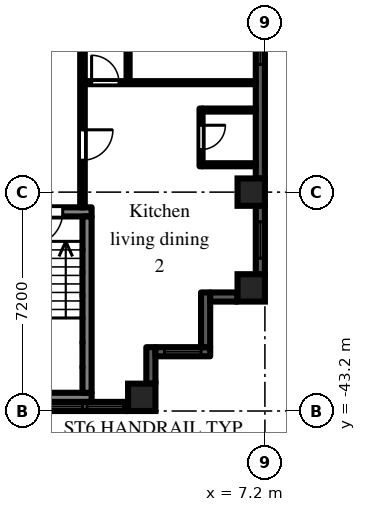
"""IFC4 building model, lengths in metres.
Left out: names, types, materials, properties, quantities, classifications, styles, units other than length and angle.
Written with IfcOpenShell. Run it as: python <this file> out.ifc"""

import sys

from ifc_helpers import new_model, si_unit, direction, frame, frame_2d, origin, origin_2d, place, context, subcontext, project, spatial, rectangle, extrude, element, fill, save


model = new_model("IFC4")
c1 = context("Model", 3, precision=1e-05, world=origin(), true_north=direction((0.0, 1.0)))
c2 = subcontext(c1, "Body", "Model", "MODEL_VIEW")
j1 = project(units=[si_unit("LENGTHUNIT", "METRE"), si_unit("PLANEANGLEUNIT", "RADIAN")], contexts=[c1])
p1 = place(None, origin())
s1 = spatial("IfcSite", under=j1, at=p1, CompositionType="ELEMENT")
p2 = place(p1, origin())
s2 = spatial("IfcBuilding", under=s1, at=p2, CompositionType="ELEMENT")
p3 = place(p2, frame((0.0, 0.0, 44.7)))
s3 = spatial("IfcBuildingStorey", under=s2, at=p3, CompositionType="ELEMENT", Elevation=44.7)
for number, where, z_axis, x_axis in (
    (1, (3.15, -42.75, 0.0), (0.0, 0.0, 1.0), (1.0, 0.0, 0.0)),
    (2, (6.75, -39.15, 0.0), (0.0, 0.0, 1.0), (1.0, 0.0, 0.0)),
    (3, (6.75, -36.0, 0.0), (0.0, 0.0, 1.0), (1.0, 0.0, 0.0)),
):
    element("IfcColumn", number, at=place(p3, frame(where, z_axis=z_axis, x_axis=x_axis)), inside=s3, PredefinedType="COLUMN", context=c2, shape_type="SweptSolid", body=[
        extrude(rectangle(XDim=0.9, YDim=0.9, at=origin_2d()), origin(), (0.0, 0.0, 1.0), 3.0),
    ])
p4 = place(p3, frame((-2.7, -43.05, 0.0), z_axis=(0.0, 0.0, 1.0), x_axis=(1.0, 0.0, 0.0)))
e4 = element("IfcWall", 4, at=p4, inside=s3, PredefinedType="SOLIDWALL", context=c2, shape_type="SweptSolid", body=[
    extrude(rectangle(XDim=5.4, YDim=0.3, at=frame_2d((2.7, 0.0))), origin(), (0.0, 0.0, 1.0), 2.1),
])
p5 = place(p4, frame((1.5, 0.0, 0.2)))
e5 = element("IfcOpeningElement", 5, at=p5, cuts=e4, PredefinedType="OPENING", context=c2, shape_type="SweptSolid", body=[
    extrude(rectangle(XDim=2.4, YDim=1.85, at=frame_2d((1.2, 0.925))), frame((0.0, 0.16, 0.0), z_axis=(0.0, -1.0, 0.0), x_axis=(1.0, 0.0, 0.0)), (0.0, 0.0, 1.0), 0.32),
])
p6 = place(p4, frame((0.15, 0.0, 0.2)))
e6 = element("IfcOpeningElement", 6, at=p6, cuts=e4, PredefinedType="OPENING", context=c2, shape_type="SweptSolid", body=[
    extrude(rectangle(XDim=1.2, YDim=1.85, at=frame_2d((0.6, 0.925))), frame((0.0, 0.16, 0.0), z_axis=(0.0, -1.0, 0.0), x_axis=(1.0, 0.0, 0.0)), (0.0, 0.0, 1.0), 0.32),
])
p7 = place(p4, frame((4.05, 0.0, 0.2)))
e7 = element("IfcOpeningElement", 7, at=p7, cuts=e4, PredefinedType="OPENING", context=c2, shape_type="SweptSolid", body=[
    extrude(rectangle(XDim=1.2, YDim=1.85, at=frame_2d((0.6, 0.925))), frame((0.0, 0.16, 0.0), z_axis=(0.0, -1.0, 0.0), x_axis=(1.0, 0.0, 0.0)), (0.0, 0.0, 1.0), 0.32),
])
p8 = place(p3, frame((3.45, -42.3, 0.0), z_axis=(0.0, 0.0, 1.0), x_axis=(0.0, 1.0, 0.0)))
e8 = element("IfcWall", 8, at=p8, inside=s3, PredefinedType="SOLIDWALL", context=c2, shape_type="SweptSolid", body=[
    extrude(rectangle(XDim=1.2, YDim=0.3, at=frame_2d((0.6, 0.0))), origin(), (0.0, 0.0, 1.0), 2.575),
])
p9 = place(p3, frame((3.6, -41.25, 0.0), z_axis=(0.0, 0.0, 1.0), x_axis=(1.0, 0.0, 0.0)))
e9 = element("IfcWall", 9, at=p9, inside=s3, PredefinedType="SOLIDWALL", context=c2, shape_type="SweptSolid", body=[
    extrude(rectangle(XDim=1.8, YDim=0.3, at=frame_2d((0.9, 0.0))), origin(), (0.0, 0.0, 1.0), 2.575),
])
p10 = place(p9, frame((0.3, 0.0, 0.2)))
e10 = element("IfcOpeningElement", 10, at=p10, cuts=e9, PredefinedType="OPENING", context=c2, shape_type="SweptSolid", body=[
    extrude(rectangle(XDim=1.2, YDim=1.85, at=frame_2d((0.6, 0.925))), frame((0.0, 0.16, 0.0), z_axis=(0.0, -1.0, 0.0), x_axis=(1.0, 0.0, 0.0)), (0.0, 0.0, 1.0), 0.32),
])
p11 = place(p3, frame((5.25, -41.1, 0.0), z_axis=(0.0, 0.0, 1.0), x_axis=(0.0, 1.0, 0.0)))
e11 = element("IfcWall", 11, at=p11, inside=s3, PredefinedType="SOLIDWALL", context=c2, shape_type="SweptSolid", body=[
    extrude(rectangle(XDim=1.8, YDim=0.3, at=frame_2d((0.9, 0.0))), origin(), (0.0, 0.0, 1.0), 2.575),
])
p12 = place(p3, frame((5.4, -39.45, 0.0), z_axis=(0.0, 0.0, 1.0), x_axis=(1.0, 0.0, 0.0)))
e12 = element("IfcWall", 12, at=p12, inside=s3, PredefinedType="SOLIDWALL", context=c2, shape_type="SweptSolid", body=[
    extrude(rectangle(XDim=0.9, YDim=0.3, at=frame_2d((0.45, 0.0))), origin(), (0.0, 0.0, 1.0), 2.575),
])
p13 = place(p3, frame((7.05, -38.7, 0.0), z_axis=(0.0, 0.0, 1.0), x_axis=(0.0, 1.0, 0.0)))
e13 = element("IfcWall", 13, at=p13, inside=s3, PredefinedType="SOLIDWALL", context=c2, shape_type="SweptSolid", body=[
    extrude(rectangle(XDim=2.25, YDim=0.3, at=frame_2d((1.125, 0.0))), origin(), (0.0, 0.0, 1.0), 2.1),
])
p14 = place(p13, frame((0.525, 0.0, 0.2)))
e14 = element("IfcOpeningElement", 14, at=p14, cuts=e13, PredefinedType="OPENING", context=c2, shape_type="SweptSolid", body=[
    extrude(rectangle(XDim=1.2, YDim=1.85, at=frame_2d((0.6, 0.925))), frame((0.0, 0.16, 0.0), z_axis=(0.0, -1.0, 0.0), x_axis=(1.0, 0.0, 0.0)), (0.0, 0.0, 1.0), 0.32),
])
p15 = place(p3, frame((7.05, -35.55, 0.0), z_axis=(0.0, 0.0, 1.0), x_axis=(0.0, 1.0, 0.0)))
e15 = element("IfcWall", 15, at=p15, inside=s3, PredefinedType="SOLIDWALL", context=c2, shape_type="SweptSolid", body=[
    extrude(rectangle(XDim=6.3, YDim=0.3, at=frame_2d((3.15, 0.0))), origin(), (0.0, 0.0, 1.0), 2.1),
])
p16 = place(p15, frame((3.75, 0.0, 0.2)))
e16 = element("IfcOpeningElement", 16, at=p16, cuts=e15, PredefinedType="OPENING", context=c2, shape_type="SweptSolid", body=[
    extrude(rectangle(XDim=2.4, YDim=1.85, at=frame_2d((1.2, 0.925))), frame((0.0, 0.16, 0.0), z_axis=(0.0, -1.0, 0.0), x_axis=(1.0, 0.0, 0.0)), (0.0, 0.0, 1.0), 0.32),
])
p17 = place(p3, frame((-1.5, -36.65, 0.0), z_axis=(0.0, 0.0, 1.0), x_axis=(1.0, 0.0, 0.0)))
e17 = element("IfcWall", 17, at=p17, inside=s3, PredefinedType="SHEAR", context=c2, shape_type="SweptSolid", body=[
    extrude(rectangle(XDim=3.0, YDim=0.3, at=frame_2d((1.5, 0.0))), origin(), (0.0, 0.0, 1.0), 2.575),
])
p18 = place(p17, frame((0.95, 0.0, 0.0)))
e18 = element("IfcOpeningElement", 18, at=p18, cuts=e17, PredefinedType="OPENING", context=c2, shape_type="SweptSolid", body=[
    extrude(rectangle(XDim=1.1, YDim=2.1, at=frame_2d((0.55, 1.05))), frame((0.0, 0.16, 0.0), z_axis=(0.0, -1.0, 0.0), x_axis=(1.0, 0.0, 0.0)), (0.0, 0.0, 1.0), 0.32),
])
p19 = place(p3, frame((-1.5, -42.75, 0.0), z_axis=(0.0, 0.0, 1.0), x_axis=(1.0, 0.0, 0.0)))
e19 = element("IfcWall", 19, at=p19, inside=s3, PredefinedType="SHEAR", context=c2, shape_type="SweptSolid", body=[
    extrude(rectangle(XDim=3.0, YDim=0.3, at=frame_2d((1.5, 0.0))), origin(), (0.0, 0.0, 1.0), 2.575),
])
p20 = place(p3, frame((1.35, -36.8, 0.0), z_axis=(0.0, 0.0, 1.0), x_axis=(0.0, -1.0, 0.0)))
e20 = element("IfcWall", 20, at=p20, inside=s3, PredefinedType="SHEAR", context=c2, shape_type="SweptSolid", body=[
    extrude(rectangle(XDim=5.8, YDim=0.3, at=frame_2d((2.9, 0.0))), origin(), (0.0, 0.0, 1.0), 2.575),
])
p21 = place(p3, frame((1.2, -36.5, 0.0), z_axis=(0.0, 0.0, 1.0), x_axis=(0.0, 1.0, 0.0)))
e21 = element("IfcWall", 21, at=p21, inside=s3, PredefinedType="PARTITIONING", context=c2, shape_type="SweptSolid", body=[
    extrude(rectangle(XDim=35.375, YDim=0.15, at=frame_2d((17.688, 0.0))), origin(), (0.0, 0.0, 1.0), 2.575),
])
p22 = place(p21, frame((30.75, 0.0, 0.0)))
e22 = element("IfcOpeningElement", 22, at=p22, cuts=e21, PredefinedType="OPENING", context=c2, shape_type="SweptSolid", body=[
    extrude(rectangle(XDim=0.9, YDim=2.1, at=frame_2d((0.45, 1.05))), frame((0.0, 0.085, 0.0), z_axis=(0.0, -1.0, 0.0), x_axis=(1.0, 0.0, 0.0)), (0.0, 0.0, 1.0), 0.17),
])
p23 = place(p21, frame((23.45, 0.0, 0.0)))
e23 = element("IfcOpeningElement", 23, at=p23, cuts=e21, PredefinedType="OPENING", context=c2, shape_type="SweptSolid", body=[
    extrude(rectangle(XDim=0.9, YDim=2.1, at=frame_2d((0.45, 1.05))), frame((0.0, 0.085, 0.0), z_axis=(0.0, -1.0, 0.0), x_axis=(1.0, 0.0, 0.0)), (0.0, 0.0, 1.0), 0.17),
])
p24 = place(p21, frame((19.85, 0.0, 0.0)))
e24 = element("IfcOpeningElement", 24, at=p24, cuts=e21, PredefinedType="OPENING", context=c2, shape_type="SweptSolid", body=[
    extrude(rectangle(XDim=0.9, YDim=2.1, at=frame_2d((0.45, 1.05))), frame((0.0, 0.085, 0.0), z_axis=(0.0, -1.0, 0.0), x_axis=(1.0, 0.0, 0.0)), (0.0, 0.0, 1.0), 0.17),
])
p25 = place(p21, frame((1.55, 0.0, 0.0)))
e25 = element("IfcOpeningElement", 25, at=p25, cuts=e21, PredefinedType="OPENING", context=c2, shape_type="SweptSolid", body=[
    extrude(rectangle(XDim=1.0, YDim=2.1, at=frame_2d((0.5, 1.05))), frame((0.0, 0.085, 0.0), z_axis=(0.0, -1.0, 0.0), x_axis=(1.0, 0.0, 0.0)), (0.0, 0.0, 1.0), 0.17),
])
p26 = place(p3, frame((1.275, -32.4, 0.0), z_axis=(0.0, 0.0, 1.0), x_axis=(1.0, 0.0, 0.0)))
e26 = element("IfcWall", 26, at=p26, inside=s3, PredefinedType="PARTITIONING", context=c2, shape_type="SweptSolid", body=[
    extrude(rectangle(XDim=5.625, YDim=0.1, at=frame_2d((2.812, 0.0))), origin(), (0.0, 0.0, 1.0), 2.575),
])
p27 = place(p26, frame((0.225, 0.0, 0.0)))
e27 = element("IfcOpeningElement", 27, at=p27, cuts=e26, PredefinedType="OPENING", context=c2, shape_type="SweptSolid", body=[
    extrude(rectangle(XDim=0.9, YDim=2.1, at=frame_2d((0.45, 1.05))), frame((0.0, 0.06, 0.0), z_axis=(0.0, -1.0, 0.0), x_axis=(1.0, 0.0, 0.0)), (0.0, 0.0, 1.0), 0.12),
])
p28 = place(p3, frame((2.7, -32.35, 0.0), z_axis=(0.0, 0.0, 1.0), x_axis=(0.0, 1.0, 0.0)))
e28 = element("IfcWall", 28, at=p28, inside=s3, PredefinedType="PARTITIONING", context=c2, shape_type="SweptSolid", body=[
    extrude(rectangle(XDim=14.3, YDim=0.1, at=frame_2d((7.15, 0.0))), origin(), (0.0, 0.0, 1.0), 2.575),
])
p29 = place(p28, frame((1.12, 0.0, 0.0)))
e29 = element("IfcOpeningElement", 29, at=p29, cuts=e28, PredefinedType="OPENING", context=c2, shape_type="SweptSolid", body=[
    extrude(rectangle(XDim=0.9, YDim=2.1, at=frame_2d((0.45, 1.05))), frame((0.0, 0.06, 0.0), z_axis=(0.0, -1.0, 0.0), x_axis=(1.0, 0.0, 0.0)), (0.0, 0.0, 1.0), 0.12),
])
p30 = place(p28, frame((12.28, 0.0, 0.0)))
e30 = element("IfcOpeningElement", 30, at=p30, cuts=e28, PredefinedType="OPENING", context=c2, shape_type="SweptSolid", body=[
    extrude(rectangle(XDim=0.9, YDim=2.1, at=frame_2d((0.45, 1.05))), frame((0.0, 0.06, 0.0), z_axis=(0.0, -1.0, 0.0), x_axis=(1.0, 0.0, 0.0)), (0.0, 0.0, 1.0), 0.12),
])
p31 = place(p3, frame((5.1, -35.15, 0.0), z_axis=(0.0, 0.0, 1.0), x_axis=(0.0, 1.0, 0.0)))
e31 = element("IfcWall", 31, at=p31, inside=s3, PredefinedType="PARTITIONING", context=c2, shape_type="SweptSolid", body=[
    extrude(rectangle(XDim=1.9, YDim=0.1, at=frame_2d((0.95, 0.0))), origin(), (0.0, 0.0, 1.0), 2.575),
])
p32 = place(p31, frame((0.55, 0.0, 0.0)))
e32 = element("IfcOpeningElement", 32, at=p32, cuts=e31, PredefinedType="OPENING", context=c2, shape_type="SweptSolid", body=[
    extrude(rectangle(XDim=0.8, YDim=2.1, at=frame_2d((0.4, 1.05))), frame((0.0, 0.06, 0.0), z_axis=(0.0, -1.0, 0.0), x_axis=(1.0, 0.0, 0.0)), (0.0, 0.0, 1.0), 0.12),
])
for number, where, z_axis, x_axis in (
    (33, (5.15, -35.1, 0.0), (0.0, 0.0, 1.0), (1.0, 0.0, 0.0)),
    (34, (5.15, -33.3, 0.0), (0.0, 0.0, 1.0), (1.0, 0.0, 0.0)),
):
    element("IfcWall", number, at=place(p3, frame(where, z_axis=z_axis, x_axis=x_axis)), inside=s3, PredefinedType="PARTITIONING", context=c2, shape_type="SweptSolid", body=[
        extrude(rectangle(XDim=1.75, YDim=0.1, at=frame_2d((0.875, 0.0))), origin(), (0.0, 0.0, 1.0), 2.575),
    ])
p33 = place(p5, origin())
e35 = element("IfcWindow", 35, at=p33, inside=s3, PartitioningType="SINGLE_PANEL", PredefinedType="WINDOW", context=c2, shape_type="SweptSolid", body=[
    extrude(rectangle(XDim=2.4, YDim=1.85, at=frame_2d((1.2, 0.925))), frame((0.0, 0.03, 0.0), z_axis=(0.0, -1.0, 0.0), x_axis=(1.0, 0.0, 0.0)), (0.0, 0.0, 1.0), 0.06),
])
fill(e5, e35)
p34 = place(p7, origin())
e36 = element("IfcWindow", 36, at=p34, inside=s3, PartitioningType="SINGLE_PANEL", PredefinedType="WINDOW", context=c2, shape_type="SweptSolid", body=[
    extrude(rectangle(XDim=1.2, YDim=1.85, at=frame_2d((0.6, 0.925))), frame((0.0, 0.03, 0.0), z_axis=(0.0, -1.0, 0.0), x_axis=(1.0, 0.0, 0.0)), (0.0, 0.0, 1.0), 0.06),
])
fill(e7, e36)
p35 = place(p10, origin())
e37 = element("IfcWindow", 37, at=p35, inside=s3, PartitioningType="SINGLE_PANEL", PredefinedType="WINDOW", context=c2, shape_type="SweptSolid", body=[
    extrude(rectangle(XDim=1.2, YDim=1.85, at=frame_2d((0.6, 0.925))), frame((0.0, 0.03, 0.0), z_axis=(0.0, -1.0, 0.0), x_axis=(1.0, 0.0, 0.0)), (0.0, 0.0, 1.0), 0.06),
])
fill(e10, e37)
p36 = place(p14, origin())
e38 = element("IfcWindow", 38, at=p36, inside=s3, PartitioningType="SINGLE_PANEL", PredefinedType="WINDOW", context=c2, shape_type="SweptSolid", body=[
    extrude(rectangle(XDim=1.2, YDim=1.85, at=frame_2d((0.6, 0.925))), frame((0.0, 0.03, 0.0), z_axis=(0.0, -1.0, 0.0), x_axis=(1.0, 0.0, 0.0)), (0.0, 0.0, 1.0), 0.06),
])
fill(e14, e38)
p37 = place(p16, origin())
e39 = element("IfcWindow", 39, at=p37, inside=s3, PartitioningType="SINGLE_PANEL", PredefinedType="WINDOW", context=c2, shape_type="SweptSolid", body=[
    extrude(rectangle(XDim=2.4, YDim=1.85, at=frame_2d((1.2, 0.925))), frame((0.0, 0.03, 0.0), z_axis=(0.0, -1.0, 0.0), x_axis=(1.0, 0.0, 0.0)), (0.0, 0.0, 1.0), 0.06),
])
fill(e16, e39)
p38 = place(p18, frame((1.1, 0.0, 0.0), z_axis=(0.0, 0.0, 1.0), x_axis=(-1.0, 0.0, 0.0)))
e40 = element("IfcDoor", 40, at=p38, inside=s3, OperationType="SINGLE_SWING_RIGHT", PredefinedType="DOOR", context=c2, shape_type="SweptSolid", body=[
    extrude(rectangle(XDim=1.1, YDim=2.1, at=frame_2d((0.55, 1.05))), frame((0.0, 0.025, 0.0), z_axis=(0.0, -1.0, 0.0), x_axis=(1.0, 0.0, 0.0)), (0.0, 0.0, 1.0), 0.05),
])
fill(e18, e40)
p39 = place(p32, frame((0.8, 0.0, 0.0), z_axis=(0.0, 0.0, 1.0), x_axis=(-1.0, 0.0, 0.0)))
e41 = element("IfcDoor", 41, at=p39, inside=s3, OperationType="SINGLE_SWING_LEFT", PredefinedType="DOOR", context=c2, shape_type="SweptSolid", body=[
    extrude(rectangle(XDim=0.8, YDim=2.1, at=frame_2d((0.4, 1.05))), frame((0.0, 0.025, 0.0), z_axis=(0.0, -1.0, 0.0), x_axis=(1.0, 0.0, 0.0)), (0.0, 0.0, 1.0), 0.05),
])
fill(e32, e41)
p40 = place(p25, frame((1.0, 0.0, 0.0), z_axis=(0.0, 0.0, 1.0), x_axis=(-1.0, 0.0, 0.0)))
e42 = element("IfcDoor", 42, at=p40, inside=s3, OperationType="SINGLE_SWING_LEFT", PredefinedType="DOOR", context=c2, shape_type="SweptSolid", body=[
    extrude(rectangle(XDim=1.0, YDim=2.1, at=frame_2d((0.5, 1.05))), frame((0.0, 0.025, 0.0), z_axis=(0.0, -1.0, 0.0), x_axis=(1.0, 0.0, 0.0)), (0.0, 0.0, 1.0), 0.05),
])
fill(e25, e42)
p41 = place(p27, origin())
e43 = element("IfcDoor", 43, at=p41, inside=s3, OperationType="SINGLE_SWING_LEFT", PredefinedType="DOOR", context=c2, shape_type="SweptSolid", body=[
    extrude(rectangle(XDim=0.9, YDim=2.1, at=frame_2d((0.45, 1.05))), frame((0.0, 0.025, 0.0), z_axis=(0.0, -1.0, 0.0), x_axis=(1.0, 0.0, 0.0)), (0.0, 0.0, 1.0), 0.05),
])
fill(e27, e43)
save(model, sys.argv[1])
